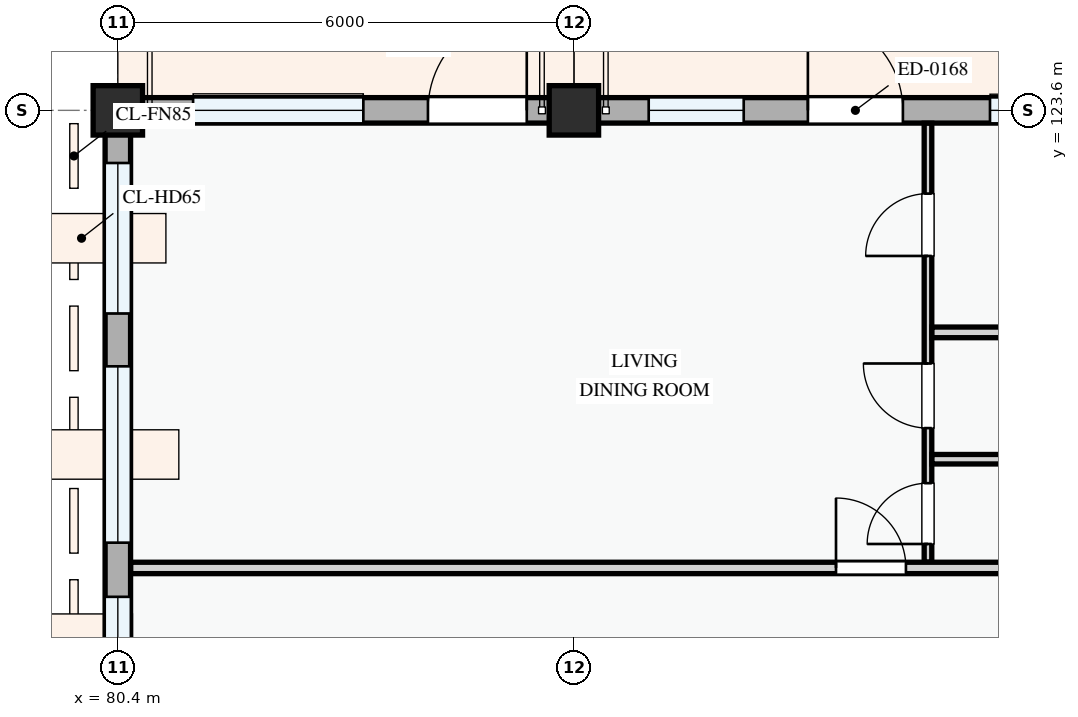
"""IFC4 building model, lengths in metres.
Left out: names, types, materials, properties, quantities, classifications, styles, units other than length and angle.
Written with IfcOpenShell. Run it as: python <this file> out.ifc"""

import sys

from ifc_helpers import new_model, si_unit, direction, frame, frame_2d, origin, origin_2d, place, context, subcontext, project, spatial, rectangle, extrude, element, fill, save


model = new_model("IFC4")
c1 = context("Model", 3, precision=1e-05, world=origin(), true_north=direction((0.0, 1.0)))
c2 = subcontext(c1, "Body", "Model", "MODEL_VIEW")
j1 = project(units=[si_unit("LENGTHUNIT", "METRE"), si_unit("PLANEANGLEUNIT", "RADIAN")], contexts=[c1])
p1 = place(None, origin())
s1 = spatial("IfcSite", under=j1, at=p1, CompositionType="ELEMENT")
p2 = place(p1, origin())
s2 = spatial("IfcBuilding", under=s1, at=p2, CompositionType="ELEMENT")
p3 = place(p2, frame((0.0, 0.0, 14.7)))
s3 = spatial("IfcBuildingStorey", under=s2, at=p3, CompositionType="ELEMENT", Elevation=14.7)
for number, where, z_axis, x_axis in (
    (1, (80.4, 123.6, 0.0), (0.0, 0.0, 1.0), (1.0, 0.0, 0.0)),
    (2, (86.4, 123.6, 0.0), (0.0, 0.0, 1.0), (1.0, 0.0, 0.0)),
):
    element("IfcColumn", number, at=place(p3, frame(where, z_axis=z_axis, x_axis=x_axis)), inside=s3, PredefinedType="COLUMN", context=c2, shape_type="SweptSolid", body=[
        extrude(rectangle(XDim=0.65, YDim=0.65, at=origin_2d()), origin(), (0.0, 0.0, 1.0), 3.3),
    ])
p4 = place(p3, frame((94.8, 123.6, 0.0), z_axis=(0.0, 0.0, 1.0), x_axis=(-1.0, 0.0, 0.0)))
e3 = element("IfcWall", 3, at=p4, inside=s3, PredefinedType="STANDARD", context=c2, shape_type="SweptSolid", body=[
    extrude(rectangle(XDim=8.4, YDim=0.335, at=frame_2d((4.2, 0.0))), origin(), (0.0, 0.0, 1.0), 2.345),
])
p5 = place(p4, frame((4.072, 0.0, 0.0)))
e4 = element("IfcOpeningElement", 4, at=p5, cuts=e3, PredefinedType="OPENING", context=c2, shape_type="SweptSolid", body=[
    extrude(rectangle(XDim=1.25, YDim=2.2, at=frame_2d((0.625, 1.1))), frame((0.0, 0.177, 0.0), z_axis=(0.0, -1.0, 0.0), x_axis=(1.0, 0.0, 0.0)), (0.0, 0.0, 1.0), 0.355),
])
p6 = place(p4, frame((1.006, 0.0, 0.78)))
e5 = element("IfcOpeningElement", 5, at=p6, cuts=e3, PredefinedType="OPENING", context=c2, shape_type="SweptSolid", body=[
    extrude(rectangle(XDim=1.92, YDim=1.44, at=frame_2d((0.96, 0.72))), frame((0.0, 0.177, 0.0), z_axis=(0.0, -1.0, 0.0), x_axis=(1.0, 0.0, 0.0)), (0.0, 0.0, 1.0), 0.355),
])
p7 = place(p4, frame((6.166, 0.0, 0.78)))
e6 = element("IfcOpeningElement", 6, at=p7, cuts=e3, PredefinedType="OPENING", context=c2, shape_type="SweptSolid", body=[
    extrude(rectangle(XDim=1.25, YDim=1.45, at=frame_2d((0.625, 0.725))), frame((0.0, 0.177, 0.0), z_axis=(0.0, -1.0, 0.0), x_axis=(1.0, 0.0, 0.0)), (0.0, 0.0, 1.0), 0.355),
])
p8 = place(p3, frame((86.4, 123.6, 0.0), z_axis=(0.0, 0.0, 1.0), x_axis=(-1.0, 0.0, 0.0)))
e7 = element("IfcWall", 7, at=p8, inside=s3, PredefinedType="STANDARD", context=c2, shape_type="SweptSolid", body=[
    extrude(rectangle(XDim=6.0, YDim=0.335, at=frame_2d((3.0, 0.0))), origin(), (0.0, 0.0, 1.0), 2.445),
])
p9 = place(p8, frame((0.62, 0.0, 0.0)))
e8 = element("IfcOpeningElement", 8, at=p9, cuts=e7, PredefinedType="OPENING", context=c2, shape_type="SweptSolid", body=[
    extrude(rectangle(XDim=1.3, YDim=2.15, at=frame_2d((0.65, 1.075))), frame((0.0, 0.177, 0.0), z_axis=(0.0, -1.0, 0.0), x_axis=(1.0, 0.0, 0.0)), (0.0, 0.0, 1.0), 0.355),
])
p10 = place(p8, frame((2.77, 0.0, 0.78)))
e9 = element("IfcOpeningElement", 9, at=p10, cuts=e7, PredefinedType="OPENING", context=c2, shape_type="SweptSolid", body=[
    extrude(rectangle(XDim=2.24, YDim=1.52, at=frame_2d((1.12, 0.76))), frame((0.0, 0.177, 0.0), z_axis=(0.0, -1.0, 0.0), x_axis=(1.0, 0.0, 0.0)), (0.0, 0.0, 1.0), 0.355),
])
p11 = place(p3, frame((80.4, 123.6, 0.0), z_axis=(0.0, 0.0, 1.0), x_axis=(0.0, -1.0, 0.0)))
e10 = element("IfcWall", 10, at=p11, inside=s3, PredefinedType="STANDARD", context=c2, shape_type="SweptSolid", body=[
    extrude(rectangle(XDim=8.4, YDim=0.335, at=frame_2d((4.2, 0.0))), origin(), (0.0, 0.0, 1.0), 2.425),
])
p12 = place(p11, frame((0.692, 0.0, 0.78)))
e11 = element("IfcOpeningElement", 11, at=p12, cuts=e10, PredefinedType="OPENING", context=c2, shape_type="SweptSolid", body=[
    extrude(rectangle(XDim=1.98, YDim=1.5, at=frame_2d((0.99, 0.75))), frame((0.0, 0.177, 0.0), z_axis=(0.0, -1.0, 0.0), x_axis=(1.0, 0.0, 0.0)), (0.0, 0.0, 1.0), 0.355),
])
p13 = place(p11, frame((3.367, 0.0, 0.78)))
e12 = element("IfcOpeningElement", 12, at=p13, cuts=e10, PredefinedType="OPENING", context=c2, shape_type="SweptSolid", body=[
    extrude(rectangle(XDim=2.32, YDim=1.5, at=frame_2d((1.16, 0.75))), frame((0.0, 0.177, 0.0), z_axis=(0.0, -1.0, 0.0), x_axis=(1.0, 0.0, 0.0)), (0.0, 0.0, 1.0), 0.355),
])
p14 = place(p11, frame((6.4, 0.0, 0.78)))
e13 = element("IfcOpeningElement", 13, at=p14, cuts=e10, PredefinedType="OPENING", context=c2, shape_type="SweptSolid", body=[
    extrude(rectangle(XDim=1.1, YDim=1.3, at=frame_2d((0.55, 0.65))), frame((0.0, 0.177, 0.0), z_axis=(0.0, -1.0, 0.0), x_axis=(1.0, 0.0, 0.0)), (0.0, 0.0, 1.0), 0.355),
])
p15 = place(p3, frame((91.058, 117.657, 0.0), z_axis=(0.0, 0.0, 1.0), x_axis=(0.0, 1.0, 0.0)))
e14 = element("IfcWall", 14, at=p15, inside=s3, PredefinedType="PARTITIONING", context=c2, shape_type="SweptSolid", body=[
    extrude(rectangle(XDim=5.773, YDim=0.1, at=frame_2d((2.887, 0.0))), origin(), (0.0, 0.0, 1.0), 3.0),
])
p16 = place(p15, frame((0.238, 0.0, 0.0)))
e15 = element("IfcOpeningElement", 15, at=p16, cuts=e14, PredefinedType="OPENING", context=c2, shape_type="SweptSolid", body=[
    extrude(rectangle(XDim=0.8, YDim=2.1, at=frame_2d((0.4, 1.05))), frame((0.0, 0.06, 0.0), z_axis=(0.0, -1.0, 0.0), x_axis=(1.0, 0.0, 0.0)), (0.0, 0.0, 1.0), 0.12),
])
p17 = place(p15, frame((1.763, 0.0, 0.0)))
e16 = element("IfcOpeningElement", 16, at=p17, cuts=e14, PredefinedType="OPENING", context=c2, shape_type="SweptSolid", body=[
    extrude(rectangle(XDim=0.85, YDim=2.1, at=frame_2d((0.425, 1.05))), frame((0.0, 0.06, 0.0), z_axis=(0.0, -1.0, 0.0), x_axis=(1.0, 0.0, 0.0)), (0.0, 0.0, 1.0), 0.12),
])
p18 = place(p15, frame((4.028, 0.0, 0.0)))
e17 = element("IfcOpeningElement", 17, at=p18, cuts=e14, PredefinedType="OPENING", context=c2, shape_type="SweptSolid", body=[
    extrude(rectangle(XDim=0.82, YDim=2.08, at=frame_2d((0.41, 1.04))), frame((0.0, 0.06, 0.0), z_axis=(0.0, -1.0, 0.0), x_axis=(1.0, 0.0, 0.0)), (0.0, 0.0, 1.0), 0.12),
])
p19 = place(p3, frame((91.11, 120.679, 0.0), z_axis=(0.0, 0.0, 1.0), x_axis=(1.0, 0.0, 0.0)))
e18 = element("IfcWall", 18, at=p19, inside=s3, PredefinedType="PARTITIONING", context=c2, shape_type="SweptSolid", body=[
    extrude(rectangle(XDim=11.335, YDim=0.14, at=frame_2d((5.667, 0.0))), origin(), (0.0, 0.0, 1.0), 3.0),
])
p20 = place(p3, frame((91.11, 119.01, 0.0), z_axis=(0.0, 0.0, 1.0), x_axis=(1.0, 0.0, 0.0)))
e19 = element("IfcWall", 19, at=p20, inside=s3, PredefinedType="PARTITIONING", context=c2, shape_type="SweptSolid", body=[
    extrude(rectangle(XDim=11.335, YDim=0.125, at=frame_2d((5.667, 0.0))), origin(), (0.0, 0.0, 1.0), 3.0),
])
p21 = place(p3, frame((80.57, 117.58, 0.0), z_axis=(0.0, 0.0, 1.0), x_axis=(1.0, 0.0, 0.0)))
e20 = element("IfcWall", 20, at=p21, inside=s3, PredefinedType="PARTITIONING", context=c2, shape_type="SweptSolid", body=[
    extrude(rectangle(XDim=71.97, YDim=0.15, at=frame_2d((35.985, 0.0))), origin(), (0.0, 0.0, 1.0), 3.0),
])
p22 = place(p21, frame((9.279, 0.0, 0.0)))
e21 = element("IfcOpeningElement", 21, at=p22, cuts=e20, PredefinedType="OPENING", context=c2, shape_type="SweptSolid", body=[
    extrude(rectangle(XDim=0.92, YDim=2.1, at=frame_2d((0.46, 1.05))), frame((0.0, 0.085, 0.0), z_axis=(0.0, -1.0, 0.0), x_axis=(1.0, 0.0, 0.0)), (0.0, 0.0, 1.0), 0.17),
])
p23 = place(p21, frame((23.985, 0.0, 0.0)))
e22 = element("IfcOpeningElement", 22, at=p23, cuts=e20, PredefinedType="OPENING", context=c2, shape_type="SweptSolid", body=[
    extrude(rectangle(XDim=0.96, YDim=2.12, at=frame_2d((0.48, 1.06))), frame((0.0, 0.085, 0.0), z_axis=(0.0, -1.0, 0.0), x_axis=(1.0, 0.0, 0.0)), (0.0, 0.0, 1.0), 0.17),
])
p24 = place(p21, frame((52.695, 0.0, 0.0)))
e23 = element("IfcOpeningElement", 23, at=p24, cuts=e20, PredefinedType="OPENING", context=c2, shape_type="SweptSolid", body=[
    extrude(rectangle(XDim=0.92, YDim=2.1, at=frame_2d((0.46, 1.05))), frame((0.0, 0.085, 0.0), z_axis=(0.0, -1.0, 0.0), x_axis=(1.0, 0.0, 0.0)), (0.0, 0.0, 1.0), 0.17),
])
p25 = place(p5, frame((1.25, 0.0, 0.0), z_axis=(0.0, 0.0, 1.0), x_axis=(-1.0, 0.0, 0.0)))
e24 = element("IfcDoor", 24, at=p25, inside=s3, OperationType="SINGLE_SWING_LEFT", PredefinedType="DOOR", context=c2, shape_type="SweptSolid", body=[
    extrude(rectangle(XDim=1.25, YDim=2.2, at=frame_2d((0.625, 1.1))), frame((0.0, 0.025, 0.0), z_axis=(0.0, -1.0, 0.0), x_axis=(1.0, 0.0, 0.0)), (0.0, 0.0, 1.0), 0.05),
])
fill(e4, e24)
p26 = place(p6, origin())
e25 = element("IfcWindow", 25, at=p26, inside=s3, PartitioningType="DOUBLE_PANEL_VERTICAL", PredefinedType="WINDOW", context=c2, shape_type="SweptSolid", body=[
    extrude(rectangle(XDim=1.92, YDim=1.44, at=frame_2d((0.96, 0.72))), frame((0.0, 0.03, 0.0), z_axis=(0.0, -1.0, 0.0), x_axis=(1.0, 0.0, 0.0)), (0.0, 0.0, 1.0), 0.06),
])
fill(e5, e25)
p27 = place(p7, origin())
e26 = element("IfcWindow", 26, at=p27, inside=s3, PartitioningType="SINGLE_PANEL", PredefinedType="WINDOW", context=c2, shape_type="SweptSolid", body=[
    extrude(rectangle(XDim=1.25, YDim=1.45, at=frame_2d((0.625, 0.725))), frame((0.0, 0.03, 0.0), z_axis=(0.0, -1.0, 0.0), x_axis=(1.0, 0.0, 0.0)), (0.0, 0.0, 1.0), 0.06),
])
fill(e6, e26)
p28 = place(p9, frame((1.3, 0.0, 0.0), z_axis=(0.0, 0.0, 1.0), x_axis=(-1.0, 0.0, 0.0)))
e27 = element("IfcDoor", 27, at=p28, inside=s3, OperationType="SINGLE_SWING_RIGHT", PredefinedType="DOOR", context=c2, shape_type="SweptSolid", body=[
    extrude(rectangle(XDim=1.3, YDim=2.15, at=frame_2d((0.65, 1.075))), frame((0.0, 0.025, 0.0), z_axis=(0.0, -1.0, 0.0), x_axis=(1.0, 0.0, 0.0)), (0.0, 0.0, 1.0), 0.05),
])
fill(e8, e27)
p29 = place(p10, origin())
e28 = element("IfcWindow", 28, at=p29, inside=s3, PartitioningType="DOUBLE_PANEL_VERTICAL", PredefinedType="WINDOW", context=c2, shape_type="SweptSolid", body=[
    extrude(rectangle(XDim=2.24, YDim=1.52, at=frame_2d((1.12, 0.76))), frame((0.0, 0.03, 0.0), z_axis=(0.0, -1.0, 0.0), x_axis=(1.0, 0.0, 0.0)), (0.0, 0.0, 1.0), 0.06),
])
fill(e9, e28)
p30 = place(p12, origin())
e29 = element("IfcWindow", 29, at=p30, inside=s3, PartitioningType="DOUBLE_PANEL_VERTICAL", PredefinedType="WINDOW", context=c2, shape_type="SweptSolid", body=[
    extrude(rectangle(XDim=1.98, YDim=1.5, at=frame_2d((0.99, 0.75))), frame((0.0, 0.03, 0.0), z_axis=(0.0, -1.0, 0.0), x_axis=(1.0, 0.0, 0.0)), (0.0, 0.0, 1.0), 0.06),
])
fill(e11, e29)
p31 = place(p13, origin())
e30 = element("IfcWindow", 30, at=p31, inside=s3, PartitioningType="DOUBLE_PANEL_VERTICAL", PredefinedType="WINDOW", context=c2, shape_type="SweptSolid", body=[
    extrude(rectangle(XDim=2.32, YDim=1.5, at=frame_2d((1.16, 0.75))), frame((0.0, 0.03, 0.0), z_axis=(0.0, -1.0, 0.0), x_axis=(1.0, 0.0, 0.0)), (0.0, 0.0, 1.0), 0.06),
])
fill(e12, e30)
p32 = place(p14, origin())
e31 = element("IfcWindow", 31, at=p32, inside=s3, PartitioningType="SINGLE_PANEL", PredefinedType="WINDOW", context=c2, shape_type="SweptSolid", body=[
    extrude(rectangle(XDim=1.1, YDim=1.3, at=frame_2d((0.55, 0.65))), frame((0.0, 0.03, 0.0), z_axis=(0.0, -1.0, 0.0), x_axis=(1.0, 0.0, 0.0)), (0.0, 0.0, 1.0), 0.06),
])
fill(e13, e31)
p33 = place(p16, origin())
e32 = element("IfcDoor", 32, at=p33, inside=s3, OperationType="SINGLE_SWING_LEFT", PredefinedType="DOOR", context=c2, shape_type="SweptSolid", body=[
    extrude(rectangle(XDim=0.8, YDim=2.1, at=frame_2d((0.4, 1.05))), frame((0.0, 0.025, 0.0), z_axis=(0.0, -1.0, 0.0), x_axis=(1.0, 0.0, 0.0)), (0.0, 0.0, 1.0), 0.05),
])
fill(e15, e32)
p34 = place(p17, origin())
e33 = element("IfcDoor", 33, at=p34, inside=s3, OperationType="SINGLE_SWING_RIGHT", PredefinedType="DOOR", context=c2, shape_type="SweptSolid", body=[
    extrude(rectangle(XDim=0.85, YDim=2.1, at=frame_2d((0.425, 1.05))), frame((0.0, 0.025, 0.0), z_axis=(0.0, -1.0, 0.0), x_axis=(1.0, 0.0, 0.0)), (0.0, 0.0, 1.0), 0.05),
])
fill(e16, e33)
p35 = place(p18, origin())
e34 = element("IfcDoor", 34, at=p35, inside=s3, OperationType="SINGLE_SWING_LEFT", PredefinedType="DOOR", context=c2, shape_type="SweptSolid", body=[
    extrude(rectangle(XDim=0.82, YDim=2.08, at=frame_2d((0.41, 1.04))), frame((0.0, 0.025, 0.0), z_axis=(0.0, -1.0, 0.0), x_axis=(1.0, 0.0, 0.0)), (0.0, 0.0, 1.0), 0.05),
])
fill(e17, e34)
p36 = place(p22, origin())
e35 = element("IfcDoor", 35, at=p36, inside=s3, OperationType="SINGLE_SWING_LEFT", PredefinedType="DOOR", context=c2, shape_type="SweptSolid", body=[
    extrude(rectangle(XDim=0.92, YDim=2.1, at=frame_2d((0.46, 1.05))), frame((0.0, 0.025, 0.0), z_axis=(0.0, -1.0, 0.0), x_axis=(1.0, 0.0, 0.0)), (0.0, 0.0, 1.0), 0.05),
])
fill(e21, e35)
save(model, sys.argv[1])
